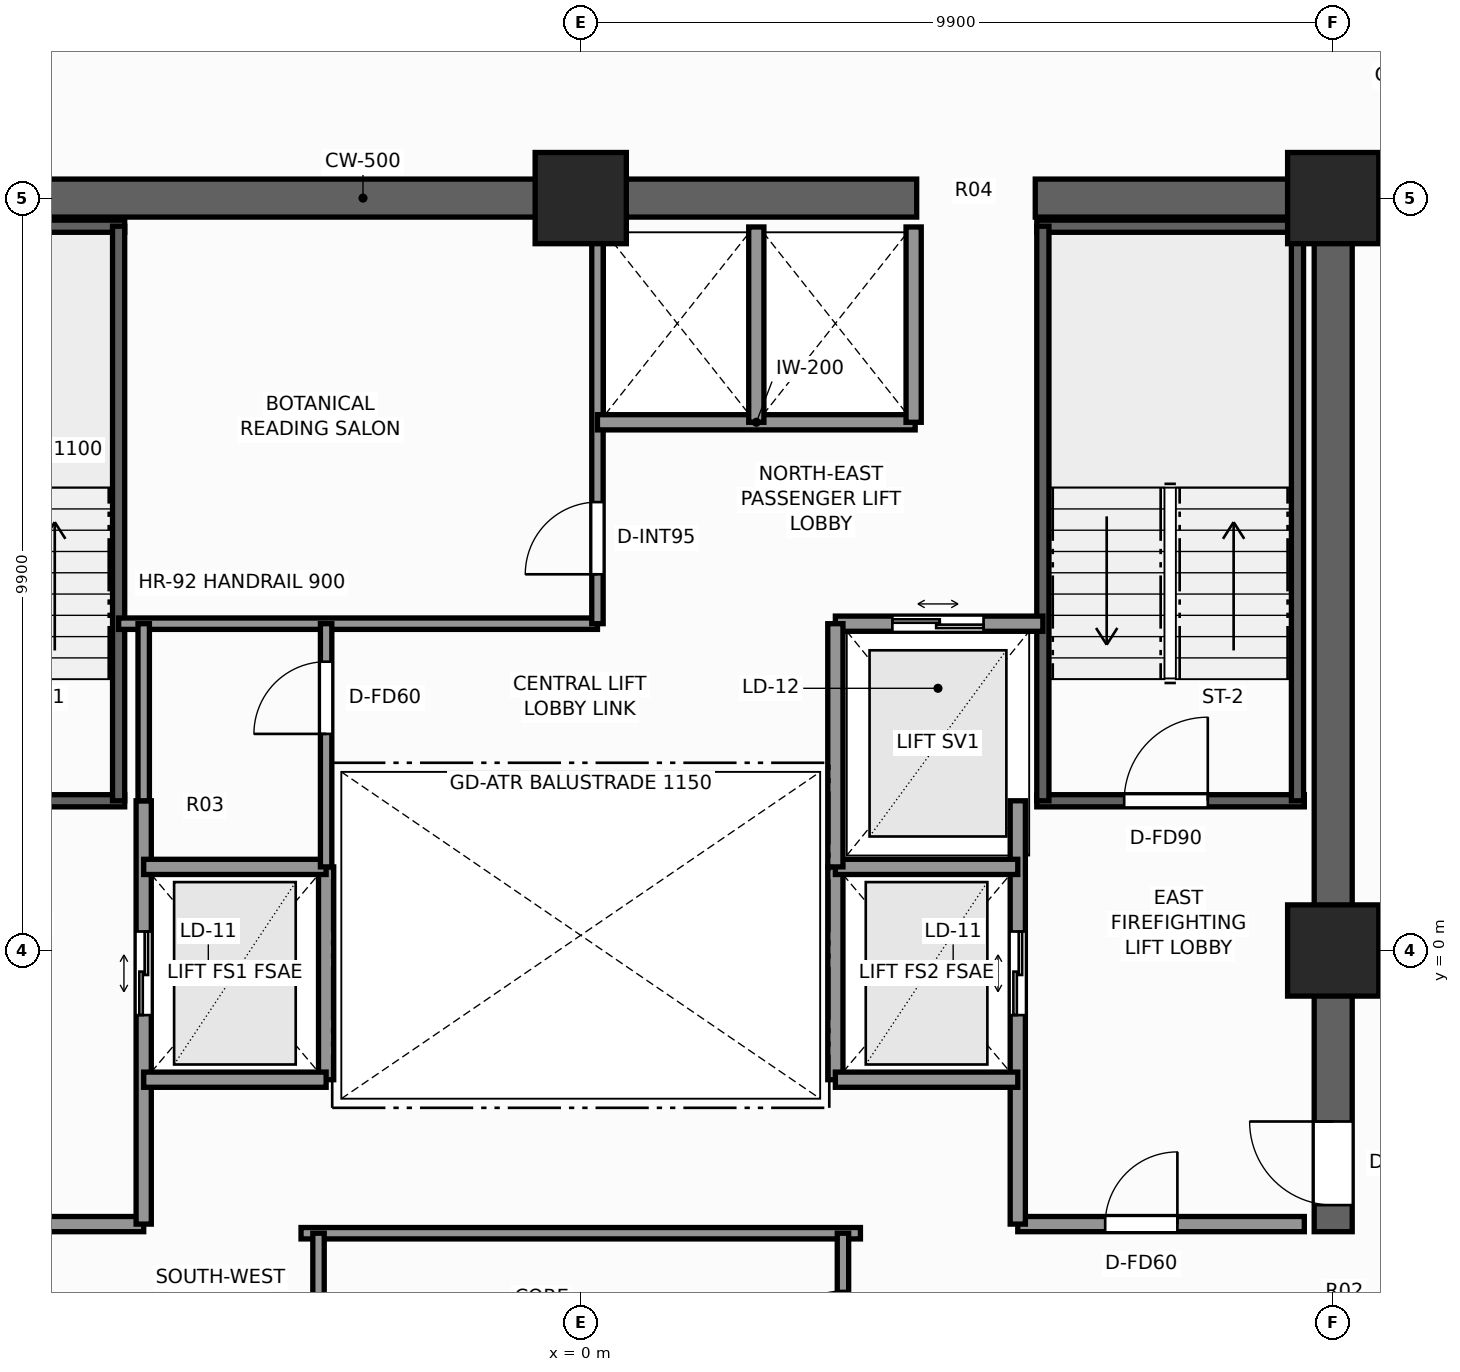
"""IFC4 building model, lengths in metres.
Left out: names, types, materials, properties, quantities, classifications, styles, units other than length and angle.
Written with IfcOpenShell. Run it as: python <this file> out.ifc"""

import sys

from ifc_helpers import new_model, si_unit, direction, frame, frame_2d, origin, origin_2d, place, context, subcontext, project, spatial, rectangle, extrude, element, fill, save


model = new_model("IFC4")
c1 = context("Model", 3, precision=1e-05, world=origin(), true_north=direction((0.0, 1.0)))
c2 = subcontext(c1, "Body", "Model", "MODEL_VIEW")
j1 = project(units=[si_unit("LENGTHUNIT", "METRE"), si_unit("PLANEANGLEUNIT", "RADIAN")], contexts=[c1])
p1 = place(None, origin())
s1 = spatial("IfcSite", under=j1, at=p1, CompositionType="ELEMENT")
p2 = place(p1, origin())
s2 = spatial("IfcBuilding", under=s1, at=p2, CompositionType="ELEMENT")
p3 = place(p2, frame((0.0, 0.0, 176.7)))
s3 = spatial("IfcBuildingStorey", under=s2, at=p3, CompositionType="ELEMENT", Elevation=176.7)
p4 = place(p3, frame((-10.15, 9.9, 0.0), z_axis=(0.0, 0.0, 1.0), x_axis=(1.0, 0.0, 0.0)))
e1 = element("IfcWall", 1, at=p4, inside=s3, PredefinedType="SHEAR", context=c2, shape_type="SweptSolid", body=[
    extrude(rectangle(XDim=14.57, YDim=0.5, at=frame_2d((7.285, 0.0))), origin(), (0.0, 0.0, 1.0), 3.3),
])
p5 = place(p3, frame((5.98, 9.9, 0.0), z_axis=(0.0, 0.0, 1.0), x_axis=(1.0, 0.0, 0.0)))
e2 = element("IfcWall", 2, at=p5, inside=s3, PredefinedType="SHEAR", context=c2, shape_type="SweptSolid", body=[
    extrude(rectangle(XDim=4.17, YDim=0.5, at=frame_2d((2.085, 0.0))), origin(), (0.0, 0.0, 1.0), 3.3),
])
p6 = place(p3, frame((9.9, -3.7, 0.0), z_axis=(0.0, 0.0, 1.0), x_axis=(0.0, 1.0, 0.0)))
e3 = element("IfcWall", 3, at=p6, inside=s3, PredefinedType="SHEAR", context=c2, shape_type="SweptSolid", body=[
    extrude(rectangle(XDim=13.35, YDim=0.5, at=frame_2d((6.675, 0.0))), origin(), (0.0, 0.0, 1.0), 3.3),
])
p7 = place(p6, frame((0.35, 0.0, 0.0)))
e4 = element("IfcOpeningElement", 4, at=p7, cuts=e3, PredefinedType="OPENING", context=c2, shape_type="SweptSolid", body=[
    extrude(rectangle(XDim=1.1, YDim=2.2, at=frame_2d((0.55, 1.1))), frame((0.0, 0.26, 0.0), z_axis=(0.0, -1.0, 0.0), x_axis=(1.0, 0.0, 0.0)), (0.0, 0.0, 1.0), 0.52),
])
for number, where, z_axis, x_axis in (
    (5, (9.9, 9.9, 0.0), (0.0, 0.0, 1.0), (1.0, 0.0, 0.0)),
    (6, (9.9, 0.0, 0.0), (0.0, 0.0, 1.0), (1.0, 0.0, 0.0)),
    (7, (0.0, 9.9, 0.0), (0.0, 0.0, 1.0), (1.0, 0.0, 0.0)),
):
    element("IfcColumn", number, at=place(p3, frame(where, z_axis=z_axis, x_axis=x_axis)), inside=s3, PredefinedType="COLUMN", context=c2, shape_type="SweptSolid", body=[
        extrude(rectangle(XDim=1.2, YDim=1.2, at=origin_2d()), origin(), (0.0, 0.0, 1.0), 3.3),
    ])
p8 = place(p3, frame((-9.52, 1.97, 0.0), z_axis=(0.0, 0.0, 1.0), x_axis=(1.0, 0.0, 0.0)))
e8 = element("IfcWall", 8, at=p8, inside=s3, PredefinedType="SHEAR", context=c2, shape_type="SweptSolid", body=[
    extrude(rectangle(XDim=3.52, YDim=0.16, at=frame_2d((1.76, 0.0))), origin(), (0.0, 0.0, 1.0), 3.3),
])
p9 = place(p8, frame((1.15, 0.0, 0.0)))
e9 = element("IfcOpeningElement", 9, at=p9, cuts=e8, PredefinedType="OPENING", context=c2, shape_type="SweptSolid", body=[
    extrude(rectangle(XDim=1.1, YDim=2.2, at=frame_2d((0.55, 1.1))), frame((0.0, 0.09, 0.0), z_axis=(0.0, -1.0, 0.0), x_axis=(1.0, 0.0, 0.0)), (0.0, 0.0, 1.0), 0.18),
])
p10 = place(p3, frame((-9.52, 9.53, 0.0), z_axis=(0.0, 0.0, 1.0), x_axis=(1.0, 0.0, 0.0)))
e10 = element("IfcWall", 10, at=p10, inside=s3, PredefinedType="SHEAR", context=c2, shape_type="SweptSolid", body=[
    extrude(rectangle(XDim=3.52, YDim=0.16, at=frame_2d((1.76, 0.0))), origin(), (0.0, 0.0, 1.0), 3.3),
])
p11 = place(p3, frame((-6.08, 1.97, 0.0), z_axis=(0.0, 0.0, 1.0), x_axis=(0.0, 1.0, 0.0)))
e11 = element("IfcWall", 11, at=p11, inside=s3, PredefinedType="SHEAR", context=c2, shape_type="SweptSolid", body=[
    extrude(rectangle(XDim=7.56, YDim=0.16, at=frame_2d((3.78, 0.0))), origin(), (0.0, 0.0, 1.0), 3.3),
])
p12 = place(p3, frame((6.0, 1.97, 0.0), z_axis=(0.0, 0.0, 1.0), x_axis=(1.0, 0.0, 0.0)))
e12 = element("IfcWall", 12, at=p12, inside=s3, PredefinedType="SHEAR", context=c2, shape_type="SweptSolid", body=[
    extrude(rectangle(XDim=3.52, YDim=0.16, at=frame_2d((1.76, 0.0))), origin(), (0.0, 0.0, 1.0), 3.3),
])
p13 = place(p12, frame((1.15, 0.0, 0.0)))
e13 = element("IfcOpeningElement", 13, at=p13, cuts=e12, PredefinedType="OPENING", context=c2, shape_type="SweptSolid", body=[
    extrude(rectangle(XDim=1.1, YDim=2.2, at=frame_2d((0.55, 1.1))), frame((0.0, 0.09, 0.0), z_axis=(0.0, -1.0, 0.0), x_axis=(1.0, 0.0, 0.0)), (0.0, 0.0, 1.0), 0.18),
])
p14 = place(p3, frame((6.0, 9.53, 0.0), z_axis=(0.0, 0.0, 1.0), x_axis=(1.0, 0.0, 0.0)))
e14 = element("IfcWall", 14, at=p14, inside=s3, PredefinedType="SHEAR", context=c2, shape_type="SweptSolid", body=[
    extrude(rectangle(XDim=3.52, YDim=0.16, at=frame_2d((1.76, 0.0))), origin(), (0.0, 0.0, 1.0), 3.3),
])
for number, where, z_axis, x_axis in (
    (15, (6.08, 1.97, 0.0), (0.0, 0.0, 1.0), (0.0, 1.0, 0.0)),
    (16, (9.43, 1.97, 0.0), (0.0, 0.0, 1.0), (0.0, 1.0, 0.0)),
):
    element("IfcWall", number, at=place(p3, frame(where, z_axis=z_axis, x_axis=x_axis)), inside=s3, PredefinedType="SHEAR", context=c2, shape_type="SweptSolid", body=[
        extrude(rectangle(XDim=7.56, YDim=0.16, at=frame_2d((3.78, 0.0))), origin(), (0.0, 0.0, 1.0), 3.3),
    ])
p15 = place(p3, frame((-9.52, -3.6, 0.0), z_axis=(0.0, 0.0, 1.0), x_axis=(1.0, 0.0, 0.0)))
e17 = element("IfcWall", 17, at=p15, inside=s3, PredefinedType="SOLIDWALL", context=c2, shape_type="SweptSolid", body=[
    extrude(rectangle(XDim=3.77, YDim=0.2, at=frame_2d((1.885, 0.0))), origin(), (0.0, 0.0, 1.0), 3.08),
])
p16 = place(p15, frame((1.15, 0.0, 0.0)))
e18 = element("IfcOpeningElement", 18, at=p16, cuts=e17, PredefinedType="OPENING", context=c2, shape_type="SweptSolid", body=[
    extrude(rectangle(XDim=0.95, YDim=2.06, at=frame_2d((0.475, 1.03))), frame((0.0, 0.11, 0.0), z_axis=(0.0, -1.0, 0.0), x_axis=(1.0, 0.0, 0.0)), (0.0, 0.0, 1.0), 0.22),
])
p17 = place(p3, frame((-5.75, -3.6, 0.0), z_axis=(0.0, 0.0, 1.0), x_axis=(0.0, 1.0, 0.0)))
e19 = element("IfcWall", 19, at=p17, inside=s3, PredefinedType="SOLIDWALL", context=c2, shape_type="SweptSolid", body=[
    extrude(rectangle(XDim=5.57, YDim=0.2, at=frame_2d((2.785, 0.0))), origin(), (0.0, 0.0, 1.0), 2.715),
])
p18 = place(p17, frame((2.75, 0.0, 0.0)))
e20 = element("IfcOpeningElement", 20, at=p18, cuts=e19, PredefinedType="OPENING", context=c2, shape_type="SweptSolid", body=[
    extrude(rectangle(XDim=1.1, YDim=2.2, at=frame_2d((0.55, 1.1))), frame((0.0, 0.11, 0.0), z_axis=(0.0, -1.0, 0.0), x_axis=(1.0, 0.0, 0.0)), (0.0, 0.0, 1.0), 0.22),
])
p19 = place(p3, frame((-3.35, -1.7, 0.0), z_axis=(0.0, 0.0, 1.0), x_axis=(0.0, 1.0, 0.0)))
e21 = element("IfcWall", 21, at=p19, inside=s3, PredefinedType="SOLIDWALL", context=c2, shape_type="SweptSolid", body=[
    extrude(rectangle(XDim=2.8, YDim=0.2, at=frame_2d((1.4, 0.0))), origin(), (0.0, 0.0, 1.0), 2.715),
])
for number, where, z_axis, x_axis in (
    (22, (-5.75, -1.7, 0.0), (0.0, 0.0, 1.0), (1.0, 0.0, 0.0)),
    (23, (-5.75, 1.1, 0.0), (0.0, 0.0, 1.0), (1.0, 0.0, 0.0)),
):
    element("IfcWall", number, at=place(p3, frame(where, z_axis=z_axis, x_axis=x_axis)), inside=s3, PredefinedType="SOLIDWALL", context=c2, shape_type="SweptSolid", body=[
        extrude(rectangle(XDim=2.4, YDim=0.2, at=frame_2d((1.2, 0.0))), origin(), (0.0, 0.0, 1.0), 3.08),
    ])
p20 = place(p3, frame((5.75, -3.6, 0.0), z_axis=(0.0, 0.0, 1.0), x_axis=(1.0, 0.0, 0.0)))
e24 = element("IfcWall", 24, at=p20, inside=s3, PredefinedType="SOLIDWALL", context=c2, shape_type="SweptSolid", body=[
    extrude(rectangle(XDim=3.77, YDim=0.2, at=frame_2d((1.885, 0.0))), origin(), (0.0, 0.0, 1.0), 3.08),
])
p21 = place(p20, frame((1.15, 0.0, 0.0)))
e25 = element("IfcOpeningElement", 25, at=p21, cuts=e24, PredefinedType="OPENING", context=c2, shape_type="SweptSolid", body=[
    extrude(rectangle(XDim=0.95, YDim=2.06, at=frame_2d((0.475, 1.03))), frame((0.0, 0.11, 0.0), z_axis=(0.0, -1.0, 0.0), x_axis=(1.0, 0.0, 0.0)), (0.0, 0.0, 1.0), 0.22),
])
p22 = place(p3, frame((5.75, -3.6, 0.0), z_axis=(0.0, 0.0, 1.0), x_axis=(0.0, 1.0, 0.0)))
e26 = element("IfcWall", 26, at=p22, inside=s3, PredefinedType="SOLIDWALL", context=c2, shape_type="SweptSolid", body=[
    extrude(rectangle(XDim=5.57, YDim=0.2, at=frame_2d((2.785, 0.0))), origin(), (0.0, 0.0, 1.0), 2.715),
])
p23 = place(p22, frame((2.75, 0.0, 0.0)))
e27 = element("IfcOpeningElement", 27, at=p23, cuts=e26, PredefinedType="OPENING", context=c2, shape_type="SweptSolid", body=[
    extrude(rectangle(XDim=1.1, YDim=2.2, at=frame_2d((0.55, 1.1))), frame((0.0, 0.11, 0.0), z_axis=(0.0, -1.0, 0.0), x_axis=(1.0, 0.0, 0.0)), (0.0, 0.0, 1.0), 0.22),
])
p24 = place(p3, frame((3.35, -1.7, 0.0), z_axis=(0.0, 0.0, 1.0), x_axis=(0.0, 1.0, 0.0)))
e28 = element("IfcWall", 28, at=p24, inside=s3, PredefinedType="SOLIDWALL", context=c2, shape_type="SweptSolid", body=[
    extrude(rectangle(XDim=2.8, YDim=0.2, at=frame_2d((1.4, 0.0))), origin(), (0.0, 0.0, 1.0), 2.715),
])
for number, where, z_axis, x_axis in (
    (29, (3.35, -1.7, 0.0), (0.0, 0.0, 1.0), (1.0, 0.0, 0.0)),
    (30, (3.35, 1.1, 0.0), (0.0, 0.0, 1.0), (1.0, 0.0, 0.0)),
):
    element("IfcWall", number, at=place(p3, frame(where, z_axis=z_axis, x_axis=x_axis)), inside=s3, PredefinedType="SOLIDWALL", context=c2, shape_type="SweptSolid", body=[
        extrude(rectangle(XDim=2.4, YDim=0.2, at=frame_2d((1.2, 0.0))), origin(), (0.0, 0.0, 1.0), 3.08),
    ])
p25 = place(p3, frame((3.35, 4.3, 0.0), z_axis=(0.0, 0.0, 1.0), x_axis=(1.0, 0.0, 0.0)))
e31 = element("IfcWall", 31, at=p25, inside=s3, PredefinedType="SOLIDWALL", context=c2, shape_type="SweptSolid", body=[
    extrude(rectangle(XDim=2.73, YDim=0.2, at=frame_2d((1.365, 0.0))), origin(), (0.0, 0.0, 1.0), 3.08),
])
p26 = place(p25, frame((0.75, 0.0, 0.0)))
e32 = element("IfcOpeningElement", 32, at=p26, cuts=e31, PredefinedType="OPENING", context=c2, shape_type="SweptSolid", body=[
    extrude(rectangle(XDim=1.2, YDim=2.25, at=frame_2d((0.6, 1.125))), frame((0.0, 0.11, 0.0), z_axis=(0.0, -1.0, 0.0), x_axis=(1.0, 0.0, 0.0)), (0.0, 0.0, 1.0), 0.22),
])
p27 = place(p3, frame((3.35, 1.1, 0.0), z_axis=(0.0, 0.0, 1.0), x_axis=(0.0, 1.0, 0.0)))
e33 = element("IfcWall", 33, at=p27, inside=s3, PredefinedType="SOLIDWALL", context=c2, shape_type="SweptSolid", body=[
    extrude(rectangle(XDim=3.2, YDim=0.2, at=frame_2d((1.6, 0.0))), origin(), (0.0, 0.0, 1.0), 2.715),
])
p28 = place(p3, frame((-6.08, 4.3, 0.0), z_axis=(0.0, 0.0, 1.0), x_axis=(1.0, 0.0, 0.0)))
e34 = element("IfcWall", 34, at=p28, inside=s3, PredefinedType="PARTITIONING", context=c2, shape_type="SweptSolid", body=[
    extrude(rectangle(XDim=6.3, YDim=0.15, at=frame_2d((3.15, 0.0))), origin(), (0.0, 0.0, 1.0), 3.08),
])
p29 = place(p3, frame((0.22, 4.3, 0.0), z_axis=(0.0, 0.0, 1.0), x_axis=(0.0, 1.0, 0.0)))
e35 = element("IfcWall", 35, at=p29, inside=s3, PredefinedType="PARTITIONING", context=c2, shape_type="SweptSolid", body=[
    extrude(rectangle(XDim=5.22, YDim=0.15, at=frame_2d((2.61, 0.0))), origin(), (0.0, 0.0, 1.0), 3.08),
])
p30 = place(p29, frame((0.65, 0.0, 0.0)))
e36 = element("IfcOpeningElement", 36, at=p30, cuts=e35, PredefinedType="OPENING", context=c2, shape_type="SweptSolid", body=[
    extrude(rectangle(XDim=0.95, YDim=2.06, at=frame_2d((0.475, 1.03))), frame((0.0, 0.085, 0.0), z_axis=(0.0, -1.0, 0.0), x_axis=(1.0, 0.0, 0.0)), (0.0, 0.0, 1.0), 0.17),
])
p31 = place(p3, frame((0.22, 6.95, 0.0), z_axis=(0.0, 0.0, 1.0), x_axis=(1.0, 0.0, 0.0)))
e37 = element("IfcWall", 37, at=p31, inside=s3, PredefinedType="SOLIDWALL", context=c2, shape_type="SweptSolid", body=[
    extrude(rectangle(XDim=4.18, YDim=0.2, at=frame_2d((2.09, 0.0))), origin(), (0.0, 0.0, 1.0), 3.08),
])
for number, where, z_axis, x_axis in (
    (38, (4.38, 6.95, 0.0), (0.0, 0.0, 1.0), (0.0, 1.0, 0.0)),
    (39, (2.31, 6.95, 0.0), (0.0, 0.0, 1.0), (0.0, 1.0, 0.0)),
):
    element("IfcWall", number, at=place(p3, frame(where, z_axis=z_axis, x_axis=x_axis)), inside=s3, PredefinedType="SOLIDWALL", context=c2, shape_type="SweptSolid", body=[
        extrude(rectangle(XDim=2.57, YDim=0.2, at=frame_2d((1.285, 0.0))), origin(), (0.0, 0.0, 1.0), 3.08),
    ])
p32 = place(p3, frame((-3.68, -3.72, 0.0), z_axis=(0.0, 0.0, 1.0), x_axis=(1.0, 0.0, 0.0)))
e40 = element("IfcWall", 40, at=p32, inside=s3, PredefinedType="PARTITIONING", context=c2, shape_type="SweptSolid", body=[
    extrude(rectangle(XDim=7.36, YDim=0.15, at=frame_2d((3.68, 0.0))), origin(), (0.0, 0.0, 1.0), 3.08),
])
p33 = place(p3, frame((3.45, -6.08, 0.0), z_axis=(0.0, 0.0, 1.0), x_axis=(0.0, 1.0, 0.0)))
e41 = element("IfcWall", 41, at=p33, inside=s3, PredefinedType="PARTITIONING", context=c2, shape_type="SweptSolid", body=[
    extrude(rectangle(XDim=2.36, YDim=0.15, at=frame_2d((1.18, 0.0))), origin(), (0.0, 0.0, 1.0), 3.08),
])
p34 = place(p33, frame((0.65, 0.0, 0.0)))
e42 = element("IfcOpeningElement", 42, at=p34, cuts=e41, PredefinedType="OPENING", context=c2, shape_type="SweptSolid", body=[
    extrude(rectangle(XDim=0.95, YDim=2.06, at=frame_2d((0.475, 1.03))), frame((0.0, 0.085, 0.0), z_axis=(0.0, -1.0, 0.0), x_axis=(1.0, 0.0, 0.0)), (0.0, 0.0, 1.0), 0.17),
])
p35 = place(p3, frame((-3.45, -6.08, 0.0), z_axis=(0.0, 0.0, 1.0), x_axis=(0.0, 1.0, 0.0)))
e43 = element("IfcWall", 43, at=p35, inside=s3, PredefinedType="PARTITIONING", context=c2, shape_type="SweptSolid", body=[
    extrude(rectangle(XDim=2.36, YDim=0.15, at=frame_2d((1.18, 0.0))), origin(), (0.0, 0.0, 1.0), 3.08),
])
p36 = place(p3, frame((-3.35, 1.1, 0.0), z_axis=(0.0, 0.0, 1.0), x_axis=(0.0, 1.0, 0.0)))
e44 = element("IfcWall", 44, at=p36, inside=s3, PredefinedType="PARTITIONING", context=c2, shape_type="SweptSolid", body=[
    extrude(rectangle(XDim=3.2, YDim=0.15, at=frame_2d((1.6, 0.0))), origin(), (0.0, 0.0, 1.0), 2.715),
])
p37 = place(p36, frame((1.75, 0.0, 0.0)))
e45 = element("IfcOpeningElement", 45, at=p37, cuts=e44, PredefinedType="OPENING", context=c2, shape_type="SweptSolid", body=[
    extrude(rectangle(XDim=0.95, YDim=2.06, at=frame_2d((0.475, 1.03))), frame((0.0, 0.085, 0.0), z_axis=(0.0, -1.0, 0.0), x_axis=(1.0, 0.0, 0.0)), (0.0, 0.0, 1.0), 0.17),
])
p38 = place(p3, frame((-5.75, 1.97, 0.0), z_axis=(0.0, 0.0, 1.0), x_axis=(0.0, 1.0, 0.0)))
e46 = element("IfcWall", 46, at=p38, inside=s3, PredefinedType="PARTITIONING", context=c2, shape_type="SweptSolid", body=[
    extrude(rectangle(XDim=2.33, YDim=0.15, at=frame_2d((1.165, 0.0))), origin(), (0.0, 0.0, 1.0), 2.715),
])
p39 = place(p13, origin())
e47 = element("IfcDoor", 47, at=p39, inside=s3, OperationType="SINGLE_SWING_RIGHT", PredefinedType="DOOR", context=c2, shape_type="SweptSolid", body=[
    extrude(rectangle(XDim=1.1, YDim=2.2, at=frame_2d((0.55, 1.1))), frame((0.0, 0.025, 0.0), z_axis=(0.0, -1.0, 0.0), x_axis=(1.0, 0.0, 0.0)), (0.0, 0.0, 1.0), 0.05),
])
fill(e13, e47)
p40 = place(p18, origin())
e48 = element("IfcDoor", 48, at=p40, inside=s3, OperationType="DOUBLE_DOOR_SLIDING", PredefinedType="DOOR", context=c2, shape_type="SweptSolid", body=[
    extrude(rectangle(XDim=1.1, YDim=2.2, at=frame_2d((0.55, 1.1))), frame((0.0, 0.025, 0.0), z_axis=(0.0, -1.0, 0.0), x_axis=(1.0, 0.0, 0.0)), (0.0, 0.0, 1.0), 0.05),
])
fill(e20, e48)
p41 = place(p7, origin())
e49 = element("IfcDoor", 49, at=p41, inside=s3, OperationType="SINGLE_SWING_RIGHT", PredefinedType="DOOR", context=c2, shape_type="SweptSolid", body=[
    extrude(rectangle(XDim=1.1, YDim=2.2, at=frame_2d((0.55, 1.1))), frame((0.0, 0.025, 0.0), z_axis=(0.0, -1.0, 0.0), x_axis=(1.0, 0.0, 0.0)), (0.0, 0.0, 1.0), 0.05),
])
fill(e4, e49)
p42 = place(p23, origin())
e50 = element("IfcDoor", 50, at=p42, inside=s3, OperationType="DOUBLE_DOOR_SLIDING", PredefinedType="DOOR", context=c2, shape_type="SweptSolid", body=[
    extrude(rectangle(XDim=1.1, YDim=2.2, at=frame_2d((0.55, 1.1))), frame((0.0, 0.025, 0.0), z_axis=(0.0, -1.0, 0.0), x_axis=(1.0, 0.0, 0.0)), (0.0, 0.0, 1.0), 0.05),
])
fill(e27, e50)
p43 = place(p26, origin())
e51 = element("IfcDoor", 51, at=p43, inside=s3, OperationType="DOUBLE_DOOR_SLIDING", PredefinedType="DOOR", context=c2, shape_type="SweptSolid", body=[
    extrude(rectangle(XDim=1.2, YDim=2.25, at=frame_2d((0.6, 1.125))), frame((0.0, 0.025, 0.0), z_axis=(0.0, -1.0, 0.0), x_axis=(1.0, 0.0, 0.0)), (0.0, 0.0, 1.0), 0.05),
])
fill(e32, e51)
p44 = place(p30, origin())
e52 = element("IfcDoor", 52, at=p44, inside=s3, OperationType="SINGLE_SWING_LEFT", PredefinedType="DOOR", context=c2, shape_type="SweptSolid", body=[
    extrude(rectangle(XDim=0.95, YDim=2.06, at=frame_2d((0.475, 1.03))), frame((0.0, 0.025, 0.0), z_axis=(0.0, -1.0, 0.0), x_axis=(1.0, 0.0, 0.0)), (0.0, 0.0, 1.0), 0.05),
])
fill(e36, e52)
p45 = place(p21, origin())
e53 = element("IfcDoor", 53, at=p45, inside=s3, OperationType="SINGLE_SWING_RIGHT", PredefinedType="DOOR", context=c2, shape_type="SweptSolid", body=[
    extrude(rectangle(XDim=0.95, YDim=2.06, at=frame_2d((0.475, 1.03))), frame((0.0, 0.025, 0.0), z_axis=(0.0, -1.0, 0.0), x_axis=(1.0, 0.0, 0.0)), (0.0, 0.0, 1.0), 0.05),
])
fill(e25, e53)
p46 = place(p34, origin())
e54 = element("IfcDoor", 54, at=p46, inside=s3, OperationType="SINGLE_SWING_LEFT", PredefinedType="DOOR", context=c2, shape_type="SweptSolid", body=[
    extrude(rectangle(XDim=0.95, YDim=2.06, at=frame_2d((0.475, 1.03))), frame((0.0, 0.025, 0.0), z_axis=(0.0, -1.0, 0.0), x_axis=(1.0, 0.0, 0.0)), (0.0, 0.0, 1.0), 0.05),
])
fill(e42, e54)
p47 = place(p37, origin())
e55 = element("IfcDoor", 55, at=p47, inside=s3, OperationType="SINGLE_SWING_LEFT", PredefinedType="DOOR", context=c2, shape_type="SweptSolid", body=[
    extrude(rectangle(XDim=0.95, YDim=2.06, at=frame_2d((0.475, 1.03))), frame((0.0, 0.025, 0.0), z_axis=(0.0, -1.0, 0.0), x_axis=(1.0, 0.0, 0.0)), (0.0, 0.0, 1.0), 0.05),
])
fill(e45, e55)
save(model, sys.argv[1])
